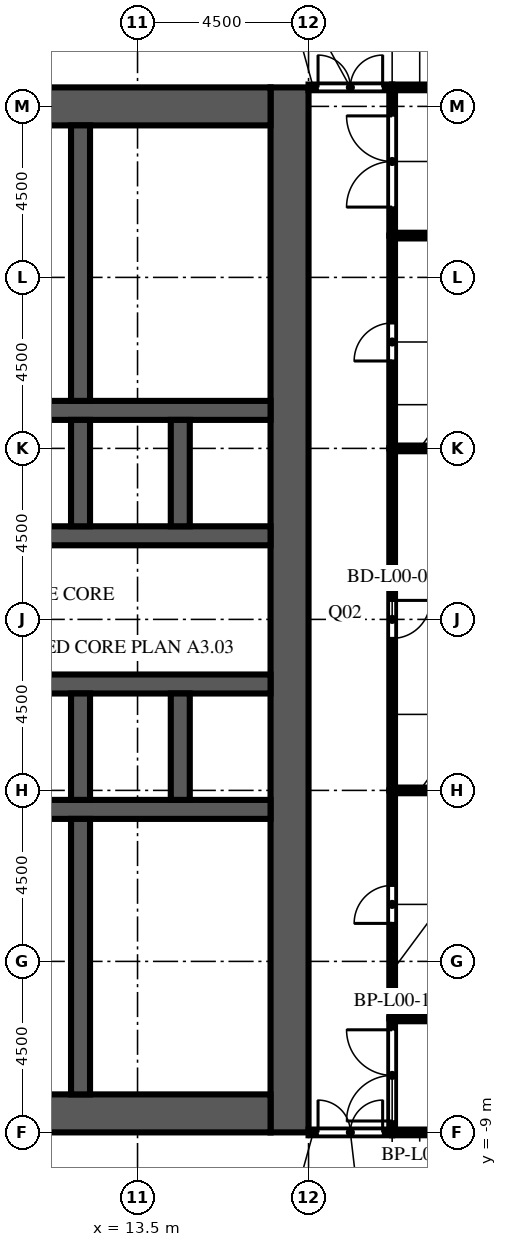
"""IFC4 building model, lengths in metres.
Left out: names, types, materials, properties, quantities, classifications, styles, units other than length and angle.
Written with IfcOpenShell. Run it as: python <this file> out.ifc"""

import sys

from ifc_helpers import new_model, si_unit, direction, frame, frame_2d, origin, place, context, subcontext, project, spatial, rectangle, extrude, element, fill, save


model = new_model("IFC4")
c1 = context("Model", 3, precision=1e-05, world=origin(), true_north=direction((0.0, 1.0)))
c2 = subcontext(c1, "Body", "Model", "MODEL_VIEW")
j1 = project(units=[si_unit("LENGTHUNIT", "METRE"), si_unit("PLANEANGLEUNIT", "RADIAN")], contexts=[c1])
p1 = place(None, origin())
s1 = spatial("IfcSite", under=j1, at=p1, CompositionType="ELEMENT")
p2 = place(p1, origin())
s2 = spatial("IfcBuilding", under=s1, at=p2, CompositionType="ELEMENT")
p3 = place(p2, origin())
s3 = spatial("IfcBuildingStorey", under=s2, at=p3, CompositionType="ELEMENT", Elevation=0.0)
p4 = place(p3, frame((17.5, -9.0, 0.0), z_axis=(0.0, 0.0, 1.0), x_axis=(0.0, 1.0, 0.0)))
e1 = element("IfcWall", 1, at=p4, inside=s3, PredefinedType="SHEAR", context=c2, shape_type="SweptSolid", body=[
    extrude(rectangle(XDim=27.5, YDim=1.0, at=frame_2d((13.75, 0.0))), origin(), (0.0, 0.0, 1.0), 7.2),
])
p5 = place(p4, frame((12.55, 0.0, 0.0)))
e2 = element("IfcOpeningElement", 2, at=p5, cuts=e1, PredefinedType="OPENING", context=c2, shape_type="SweptSolid", body=[
    extrude(rectangle(XDim=2.4, YDim=2.4, at=frame_2d((1.2, 1.2))), frame((0.0, 0.51, 0.0), z_axis=(0.0, -1.0, 0.0), x_axis=(1.0, 0.0, 0.0)), (0.0, 0.0, 1.0), 1.02),
])
p6 = place(p4, frame((6.825, 0.0, 0.0)))
e3 = element("IfcOpeningElement", 3, at=p6, cuts=e1, PredefinedType="OPENING", context=c2, shape_type="SweptSolid", body=[
    extrude(rectangle(XDim=1.2, YDim=2.1, at=frame_2d((0.6, 1.05))), frame((0.0, 0.51, 0.0), z_axis=(0.0, -1.0, 0.0), x_axis=(1.0, 0.0, 0.0)), (0.0, 0.0, 1.0), 1.02),
])
p7 = place(p4, frame((19.475, 0.0, 0.0)))
e4 = element("IfcOpeningElement", 4, at=p7, cuts=e1, PredefinedType="OPENING", context=c2, shape_type="SweptSolid", body=[
    extrude(rectangle(XDim=1.2, YDim=2.1, at=frame_2d((0.6, 1.05))), frame((0.0, 0.51, 0.0), z_axis=(0.0, -1.0, 0.0), x_axis=(1.0, 0.0, 0.0)), (0.0, 0.0, 1.0), 1.02),
])
for number, where, z_axis, x_axis in (
    (5, (7.0, -8.5, 0.0), (0.0, 0.0, 1.0), (1.0, 0.0, 0.0)),
    (6, (7.0, 18.0, 0.0), (0.0, 0.0, 1.0), (1.0, 0.0, 0.0)),
):
    element("IfcWall", number, at=place(p3, frame(where, z_axis=z_axis, x_axis=x_axis)), inside=s3, PredefinedType="SHEAR", context=c2, shape_type="SweptSolid", body=[
        extrude(rectangle(XDim=10.0, YDim=1.0, at=frame_2d((5.0, 0.0))), origin(), (0.0, 0.0, 1.0), 7.2),
    ])
p8 = place(p3, frame((7.0, -0.5, 0.0), z_axis=(0.0, 0.0, 1.0), x_axis=(1.0, 0.0, 0.0)))
e7 = element("IfcWall", 7, at=p8, inside=s3, PredefinedType="SHEAR", context=c2, shape_type="SweptSolid", body=[
    extrude(rectangle(XDim=10.0, YDim=0.5, at=frame_2d((5.0, 0.0))), origin(), (0.0, 0.0, 1.0), 7.2),
])
p9 = place(p3, frame((7.0, 2.8, 0.0), z_axis=(0.0, 0.0, 1.0), x_axis=(1.0, 0.0, 0.0)))
e8 = element("IfcWall", 8, at=p9, inside=s3, PredefinedType="SHEAR", context=c2, shape_type="SweptSolid", body=[
    extrude(rectangle(XDim=10.0, YDim=0.5, at=frame_2d((5.0, 0.0))), origin(), (0.0, 0.0, 1.0), 7.2),
])
p10 = place(p9, frame((0.512, 0.0, 0.0)))
e9 = element("IfcOpeningElement", 9, at=p10, cuts=e8, PredefinedType="OPENING", context=c2, shape_type="SweptSolid", body=[
    extrude(rectangle(XDim=1.1, YDim=2.1, at=frame_2d((0.55, 1.05))), frame((0.0, 0.26, 0.0), z_axis=(0.0, -1.0, 0.0), x_axis=(1.0, 0.0, 0.0)), (0.0, 0.0, 1.0), 0.52),
])
p11 = place(p9, frame((3.137, 0.0, 0.0)))
e10 = element("IfcOpeningElement", 10, at=p11, cuts=e8, PredefinedType="OPENING", context=c2, shape_type="SweptSolid", body=[
    extrude(rectangle(XDim=1.1, YDim=2.1, at=frame_2d((0.55, 1.05))), frame((0.0, 0.26, 0.0), z_axis=(0.0, -1.0, 0.0), x_axis=(1.0, 0.0, 0.0)), (0.0, 0.0, 1.0), 0.52),
])
p12 = place(p9, frame((5.762, 0.0, 0.0)))
e11 = element("IfcOpeningElement", 11, at=p12, cuts=e8, PredefinedType="OPENING", context=c2, shape_type="SweptSolid", body=[
    extrude(rectangle(XDim=1.1, YDim=2.1, at=frame_2d((0.55, 1.05))), frame((0.0, 0.26, 0.0), z_axis=(0.0, -1.0, 0.0), x_axis=(1.0, 0.0, 0.0)), (0.0, 0.0, 1.0), 0.52),
])
p13 = place(p9, frame((8.387, 0.0, 0.0)))
e12 = element("IfcOpeningElement", 12, at=p13, cuts=e8, PredefinedType="OPENING", context=c2, shape_type="SweptSolid", body=[
    extrude(rectangle(XDim=1.1, YDim=2.1, at=frame_2d((0.55, 1.05))), frame((0.0, 0.26, 0.0), z_axis=(0.0, -1.0, 0.0), x_axis=(1.0, 0.0, 0.0)), (0.0, 0.0, 1.0), 0.52),
])
p14 = place(p3, frame((7.0, 6.7, 0.0), z_axis=(0.0, 0.0, 1.0), x_axis=(1.0, 0.0, 0.0)))
e13 = element("IfcWall", 13, at=p14, inside=s3, PredefinedType="SHEAR", context=c2, shape_type="SweptSolid", body=[
    extrude(rectangle(XDim=10.0, YDim=0.5, at=frame_2d((5.0, 0.0))), origin(), (0.0, 0.0, 1.0), 7.2),
])
p15 = place(p14, frame((0.512, 0.0, 0.0)))
e14 = element("IfcOpeningElement", 14, at=p15, cuts=e13, PredefinedType="OPENING", context=c2, shape_type="SweptSolid", body=[
    extrude(rectangle(XDim=1.1, YDim=2.1, at=frame_2d((0.55, 1.05))), frame((0.0, 0.26, 0.0), z_axis=(0.0, -1.0, 0.0), x_axis=(1.0, 0.0, 0.0)), (0.0, 0.0, 1.0), 0.52),
])
p16 = place(p14, frame((3.188, 0.0, 0.0)))
e15 = element("IfcOpeningElement", 15, at=p16, cuts=e13, PredefinedType="OPENING", context=c2, shape_type="SweptSolid", body=[
    extrude(rectangle(XDim=1.0, YDim=2.1, at=frame_2d((0.5, 1.05))), frame((0.0, 0.26, 0.0), z_axis=(0.0, -1.0, 0.0), x_axis=(1.0, 0.0, 0.0)), (0.0, 0.0, 1.0), 0.52),
])
p17 = place(p14, frame((5.812, 0.0, 0.0)))
e16 = element("IfcOpeningElement", 16, at=p17, cuts=e13, PredefinedType="OPENING", context=c2, shape_type="SweptSolid", body=[
    extrude(rectangle(XDim=1.0, YDim=2.1, at=frame_2d((0.5, 1.05))), frame((0.0, 0.26, 0.0), z_axis=(0.0, -1.0, 0.0), x_axis=(1.0, 0.0, 0.0)), (0.0, 0.0, 1.0), 0.52),
])
p18 = place(p14, frame((8.438, 0.0, 0.0)))
e17 = element("IfcOpeningElement", 17, at=p18, cuts=e13, PredefinedType="OPENING", context=c2, shape_type="SweptSolid", body=[
    extrude(rectangle(XDim=1.0, YDim=2.1, at=frame_2d((0.5, 1.05))), frame((0.0, 0.26, 0.0), z_axis=(0.0, -1.0, 0.0), x_axis=(1.0, 0.0, 0.0)), (0.0, 0.0, 1.0), 0.52),
])
p19 = place(p3, frame((7.0, 10.0, 0.0), z_axis=(0.0, 0.0, 1.0), x_axis=(1.0, 0.0, 0.0)))
e18 = element("IfcWall", 18, at=p19, inside=s3, PredefinedType="SHEAR", context=c2, shape_type="SweptSolid", body=[
    extrude(rectangle(XDim=10.0, YDim=0.5, at=frame_2d((5.0, 0.0))), origin(), (0.0, 0.0, 1.0), 7.2),
])
for number, where, z_axis, x_axis in (
    (19, (12.0, -0.25, 0.0), (0.0, 0.0, 1.0), (0.0, 1.0, 0.0)),
    (20, (12.0, 6.95, 0.0), (0.0, 0.0, 1.0), (0.0, 1.0, 0.0)),
    (21, (14.625, -0.25, 0.0), (0.0, 0.0, 1.0), (0.0, 1.0, 0.0)),
    (22, (14.625, 6.95, 0.0), (0.0, 0.0, 1.0), (0.0, 1.0, 0.0)),
):
    element("IfcWall", number, at=place(p3, frame(where, z_axis=z_axis, x_axis=x_axis)), inside=s3, PredefinedType="SHEAR", context=c2, shape_type="SweptSolid", body=[
        extrude(rectangle(XDim=2.8, YDim=0.5, at=frame_2d((1.4, 0.0))), origin(), (0.0, 0.0, 1.0), 7.2),
    ])
for number, where, z_axis, x_axis in (
    (23, (12.0, -8.0, 0.0), (0.0, 0.0, 1.0), (0.0, 1.0, 0.0)),
    (24, (12.0, 10.25, 0.0), (0.0, 0.0, 1.0), (0.0, 1.0, 0.0)),
):
    element("IfcWall", number, at=place(p3, frame(where, z_axis=z_axis, x_axis=x_axis)), inside=s3, PredefinedType="SHEAR", context=c2, shape_type="SweptSolid", body=[
        extrude(rectangle(XDim=7.25, YDim=0.5, at=frame_2d((3.625, 0.0))), origin(), (0.0, 0.0, 1.0), 7.2),
    ])
p20 = place(p3, frame((7.0, -5.245, 0.0), z_axis=(0.0, 0.0, 1.0), x_axis=(1.0, 0.0, 0.0)))
e25 = element("IfcWall", 25, at=p20, inside=s3, PredefinedType="PARTITIONING", context=c2, shape_type="SweptSolid", body=[
    extrude(rectangle(XDim=4.75, YDim=0.1, at=frame_2d((2.375, 0.0))), origin(), (0.0, 0.0, 1.0), 6.75),
])
p21 = place(p20, frame((1.875, 0.0, 0.0)))
e26 = element("IfcOpeningElement", 26, at=p21, cuts=e25, PredefinedType="OPENING", context=c2, shape_type="SweptSolid", body=[
    extrude(rectangle(XDim=1.0, YDim=2.1, at=frame_2d((0.5, 1.05))), frame((0.0, 0.06, 0.0), z_axis=(0.0, -1.0, 0.0), x_axis=(1.0, 0.0, 0.0)), (0.0, 0.0, 1.0), 0.12),
])
p22 = place(p3, frame((9.945, -3.94, 0.0), z_axis=(0.0, 0.0, 1.0), x_axis=(1.0, 0.0, 0.0)))
e27 = element("IfcWall", 27, at=p22, inside=s3, PredefinedType="PARTITIONING", context=c2, shape_type="SweptSolid", body=[
    extrude(rectangle(XDim=1.805, YDim=0.1, at=frame_2d((0.902, 0.0))), origin(), (0.0, 0.0, 1.0), 6.75),
])
p23 = place(p22, frame((0.403, 0.0, 0.0)))
e28 = element("IfcOpeningElement", 28, at=p23, cuts=e27, PredefinedType="OPENING", context=c2, shape_type="SweptSolid", body=[
    extrude(rectangle(XDim=1.0, YDim=2.1, at=frame_2d((0.5, 1.05))), frame((0.0, 0.06, 0.0), z_axis=(0.0, -1.0, 0.0), x_axis=(1.0, 0.0, 0.0)), (0.0, 0.0, 1.0), 0.12),
])
for number, where, z_axis, x_axis in (
    (29, (8.3, 12.425, 0.0), (0.0, 0.0, 1.0), (1.0, 0.0, 0.0)),
    (30, (8.3, 14.962, 0.0), (0.0, 0.0, 1.0), (1.0, 0.0, 0.0)),
):
    element("IfcWall", number, at=place(p3, frame(where, z_axis=z_axis, x_axis=x_axis)), inside=s3, PredefinedType="PARTITIONING", context=c2, shape_type="SweptSolid", body=[
        extrude(rectangle(XDim=3.45, YDim=0.1, at=frame_2d((1.725, 0.0))), origin(), (0.0, 0.0, 1.0), 6.75),
    ])
p24 = place(p3, frame((18.0, -9.0, 0.0), z_axis=(0.0, 0.0, 1.0), x_axis=(1.0, 0.0, 0.0)))
e31 = element("IfcWall", 31, at=p24, inside=s3, PredefinedType="PARTITIONING", context=c2, shape_type="SweptSolid", body=[
    extrude(rectangle(XDim=2.2, YDim=0.15, at=frame_2d((1.1, 0.0))), origin(), (0.0, 0.0, 1.0), 6.75),
])
p25 = place(p24, frame((0.25, 0.0, 0.0)))
e32 = element("IfcOpeningElement", 32, at=p25, cuts=e31, PredefinedType="OPENING", context=c2, shape_type="SweptSolid", body=[
    extrude(rectangle(XDim=1.7, YDim=2.1, at=frame_2d((0.85, 1.05))), frame((0.0, 0.085, 0.0), z_axis=(0.0, -1.0, 0.0), x_axis=(1.0, 0.0, 0.0)), (0.0, 0.0, 1.0), 0.17),
])
p26 = place(p3, frame((20.2, -9.0, 0.0), z_axis=(0.0, 0.0, 1.0), x_axis=(1.0, 0.0, 0.0)))
e33 = element("IfcWall", 33, at=p26, inside=s3, PredefinedType="PARTITIONING", context=c2, shape_type="SweptSolid", body=[
    extrude(rectangle(XDim=1.45, YDim=0.15, at=frame_2d((0.725, 0.0))), origin(), (0.0, 0.0, 1.0), 6.75),
])
p27 = place(p3, frame((20.2, -9.0, 0.0), z_axis=(0.0, 0.0, 1.0), x_axis=(0.0, 1.0, 0.0)))
e34 = element("IfcWall", 34, at=p27, inside=s3, PredefinedType="PARTITIONING", context=c2, shape_type="SweptSolid", body=[
    extrude(rectangle(XDim=3.0, YDim=0.15, at=frame_2d((1.5, 0.0))), origin(), (0.0, 0.0, 1.0), 6.75),
])
p28 = place(p27, frame((0.3, 0.0, 0.0)))
e35 = element("IfcOpeningElement", 35, at=p28, cuts=e34, PredefinedType="OPENING", context=c2, shape_type="SweptSolid", body=[
    extrude(rectangle(XDim=2.4, YDim=2.4, at=frame_2d((1.2, 1.2))), frame((0.0, 0.085, 0.0), z_axis=(0.0, -1.0, 0.0), x_axis=(1.0, 0.0, 0.0)), (0.0, 0.0, 1.0), 0.17),
])
p29 = place(p3, frame((20.2, -6.0, 0.0), z_axis=(0.0, 0.0, 1.0), x_axis=(0.0, 1.0, 0.0)))
e36 = element("IfcWall", 36, at=p29, inside=s3, PredefinedType="PARTITIONING", context=c2, shape_type="SweptSolid", body=[
    extrude(rectangle(XDim=6.0, YDim=0.15, at=frame_2d((3.0, 0.0))), origin(), (0.0, 0.0, 1.0), 6.75),
])
p30 = place(p29, frame((2.5, 0.0, 0.0)))
e37 = element("IfcOpeningElement", 37, at=p30, cuts=e36, PredefinedType="OPENING", context=c2, shape_type="SweptSolid", body=[
    extrude(rectangle(XDim=1.0, YDim=2.1, at=frame_2d((0.5, 1.05))), frame((0.0, 0.085, 0.0), z_axis=(0.0, -1.0, 0.0), x_axis=(1.0, 0.0, 0.0)), (0.0, 0.0, 1.0), 0.17),
])
p31 = place(p3, frame((20.2, 0.0, 0.0), z_axis=(0.0, 0.0, 1.0), x_axis=(0.0, 1.0, 0.0)))
e38 = element("IfcWall", 38, at=p31, inside=s3, PredefinedType="PARTITIONING", context=c2, shape_type="SweptSolid", body=[
    extrude(rectangle(XDim=9.0, YDim=0.15, at=frame_2d((4.5, 0.0))), origin(), (0.0, 0.0, 1.0), 6.75),
])
p32 = place(p31, frame((4.0, 0.0, 0.0)))
e39 = element("IfcOpeningElement", 39, at=p32, cuts=e38, PredefinedType="OPENING", context=c2, shape_type="SweptSolid", body=[
    extrude(rectangle(XDim=1.0, YDim=2.1, at=frame_2d((0.5, 1.05))), frame((0.0, 0.085, 0.0), z_axis=(0.0, -1.0, 0.0), x_axis=(1.0, 0.0, 0.0)), (0.0, 0.0, 1.0), 0.17),
])
p33 = place(p3, frame((20.2, 9.0, 0.0), z_axis=(0.0, 0.0, 1.0), x_axis=(0.0, 1.0, 0.0)))
e40 = element("IfcWall", 40, at=p33, inside=s3, PredefinedType="PARTITIONING", context=c2, shape_type="SweptSolid", body=[
    extrude(rectangle(XDim=5.6, YDim=0.15, at=frame_2d((2.8, 0.0))), origin(), (0.0, 0.0, 1.0), 6.75),
])
p34 = place(p33, frame((2.3, 0.0, 0.0)))
e41 = element("IfcOpeningElement", 41, at=p34, cuts=e40, PredefinedType="OPENING", context=c2, shape_type="SweptSolid", body=[
    extrude(rectangle(XDim=1.0, YDim=2.1, at=frame_2d((0.5, 1.05))), frame((0.0, 0.085, 0.0), z_axis=(0.0, -1.0, 0.0), x_axis=(1.0, 0.0, 0.0)), (0.0, 0.0, 1.0), 0.17),
])
p35 = place(p3, frame((20.2, 14.6, 0.0), z_axis=(0.0, 0.0, 1.0), x_axis=(0.0, 1.0, 0.0)))
e42 = element("IfcWall", 42, at=p35, inside=s3, PredefinedType="PARTITIONING", context=c2, shape_type="SweptSolid", body=[
    extrude(rectangle(XDim=3.9, YDim=0.15, at=frame_2d((1.95, 0.0))), origin(), (0.0, 0.0, 1.0), 6.75),
])
p36 = place(p35, frame((0.75, 0.0, 0.0)))
e43 = element("IfcOpeningElement", 43, at=p36, cuts=e42, PredefinedType="OPENING", context=c2, shape_type="SweptSolid", body=[
    extrude(rectangle(XDim=2.4, YDim=2.4, at=frame_2d((1.2, 1.2))), frame((0.0, 0.085, 0.0), z_axis=(0.0, -1.0, 0.0), x_axis=(1.0, 0.0, 0.0)), (0.0, 0.0, 1.0), 0.17),
])
p37 = place(p3, frame((18.0, 18.5, 0.0), z_axis=(0.0, 0.0, 1.0), x_axis=(1.0, 0.0, 0.0)))
e44 = element("IfcWall", 44, at=p37, inside=s3, PredefinedType="PARTITIONING", context=c2, shape_type="SweptSolid", body=[
    extrude(rectangle(XDim=2.2, YDim=0.15, at=frame_2d((1.1, 0.0))), origin(), (0.0, 0.0, 1.0), 6.75),
])
p38 = place(p37, frame((0.25, 0.0, 0.0)))
e45 = element("IfcOpeningElement", 45, at=p38, cuts=e44, PredefinedType="OPENING", context=c2, shape_type="SweptSolid", body=[
    extrude(rectangle(XDim=1.7, YDim=2.1, at=frame_2d((0.85, 1.05))), frame((0.0, 0.085, 0.0), z_axis=(0.0, -1.0, 0.0), x_axis=(1.0, 0.0, 0.0)), (0.0, 0.0, 1.0), 0.17),
])
p39 = place(p3, frame((20.2, -6.0, 0.0), z_axis=(0.0, 0.0, 1.0), x_axis=(1.0, 0.0, 0.0)))
e46 = element("IfcWall", 46, at=p39, inside=s3, PredefinedType="PARTITIONING", context=c2, shape_type="SweptSolid", body=[
    extrude(rectangle(XDim=15.625, YDim=0.15, at=frame_2d((7.812, 0.0))), origin(), (0.0, 0.0, 1.0), 6.75),
])
for number, where, z_axis, x_axis in (
    (47, (20.2, 0.0, 0.0), (0.0, 0.0, 1.0), (1.0, 0.0, 0.0)),
    (48, (20.2, 9.0, 0.0), (0.0, 0.0, 1.0), (1.0, 0.0, 0.0)),
):
    element("IfcWall", number, at=place(p3, frame(where, z_axis=z_axis, x_axis=x_axis)), inside=s3, PredefinedType="PARTITIONING", context=c2, shape_type="SweptSolid", body=[
        extrude(rectangle(XDim=1.45, YDim=0.15, at=frame_2d((0.725, 0.0))), origin(), (0.0, 0.0, 1.0), 6.75),
    ])
p40 = place(p3, frame((20.2, 14.6, 0.0), z_axis=(0.0, 0.0, 1.0), x_axis=(1.0, 0.0, 0.0)))
e49 = element("IfcWall", 49, at=p40, inside=s3, PredefinedType="PARTITIONING", context=c2, shape_type="SweptSolid", body=[
    extrude(rectangle(XDim=15.625, YDim=0.15, at=frame_2d((7.812, 0.0))), origin(), (0.0, 0.0, 1.0), 6.75),
])
p41 = place(p3, frame((20.2, 18.5, 0.0), z_axis=(0.0, 0.0, 1.0), x_axis=(1.0, 0.0, 0.0)))
e50 = element("IfcWall", 50, at=p41, inside=s3, PredefinedType="PARTITIONING", context=c2, shape_type="SweptSolid", body=[
    extrude(rectangle(XDim=1.45, YDim=0.15, at=frame_2d((0.725, 0.0))), origin(), (0.0, 0.0, 1.0), 6.75),
])
p42 = place(p12, origin())
e51 = element("IfcDoor", 51, at=p42, inside=s3, OperationType="DOUBLE_DOOR_SLIDING", PredefinedType="DOOR", context=c2, shape_type="SweptSolid", body=[
    extrude(rectangle(XDim=1.1, YDim=2.1, at=frame_2d((0.55, 1.05))), frame((0.0, 0.025, 0.0), z_axis=(0.0, -1.0, 0.0), x_axis=(1.0, 0.0, 0.0)), (0.0, 0.0, 1.0), 0.05),
])
fill(e11, e51)
p43 = place(p13, origin())
e52 = element("IfcDoor", 52, at=p43, inside=s3, OperationType="DOUBLE_DOOR_SLIDING", PredefinedType="DOOR", context=c2, shape_type="SweptSolid", body=[
    extrude(rectangle(XDim=1.1, YDim=2.1, at=frame_2d((0.55, 1.05))), frame((0.0, 0.025, 0.0), z_axis=(0.0, -1.0, 0.0), x_axis=(1.0, 0.0, 0.0)), (0.0, 0.0, 1.0), 0.05),
])
fill(e12, e52)
p44 = place(p5, origin())
e53 = element("IfcDoor", 53, at=p44, inside=s3, OperationType="DOUBLE_DOOR_DOUBLE_SWING", PredefinedType="DOOR", context=c2, shape_type="SweptSolid", body=[
    extrude(rectangle(XDim=2.4, YDim=2.4, at=frame_2d((1.2, 1.2))), frame((0.0, 0.025, 0.0), z_axis=(0.0, -1.0, 0.0), x_axis=(1.0, 0.0, 0.0)), (0.0, 0.0, 1.0), 0.05),
])
fill(e2, e53)
p45 = place(p6, frame((1.2, 0.0, 0.0), z_axis=(0.0, 0.0, 1.0), x_axis=(-1.0, 0.0, 0.0)))
e54 = element("IfcDoor", 54, at=p45, inside=s3, OperationType="SINGLE_SWING_LEFT", PredefinedType="DOOR", context=c2, shape_type="SweptSolid", body=[
    extrude(rectangle(XDim=1.2, YDim=2.1, at=frame_2d((0.6, 1.05))), frame((0.0, 0.025, 0.0), z_axis=(0.0, -1.0, 0.0), x_axis=(1.0, 0.0, 0.0)), (0.0, 0.0, 1.0), 0.05),
])
fill(e3, e54)
p46 = place(p7, frame((1.2, 0.0, 0.0), z_axis=(0.0, 0.0, 1.0), x_axis=(-1.0, 0.0, 0.0)))
e55 = element("IfcDoor", 55, at=p46, inside=s3, OperationType="SINGLE_SWING_LEFT", PredefinedType="DOOR", context=c2, shape_type="SweptSolid", body=[
    extrude(rectangle(XDim=1.2, YDim=2.1, at=frame_2d((0.6, 1.05))), frame((0.0, 0.025, 0.0), z_axis=(0.0, -1.0, 0.0), x_axis=(1.0, 0.0, 0.0)), (0.0, 0.0, 1.0), 0.05),
])
fill(e4, e55)
p47 = place(p17, origin())
e56 = element("IfcDoor", 56, at=p47, inside=s3, OperationType="SINGLE_SWING_LEFT", PredefinedType="DOOR", context=c2, shape_type="SweptSolid", body=[
    extrude(rectangle(XDim=1.0, YDim=2.1, at=frame_2d((0.5, 1.05))), frame((0.0, 0.025, 0.0), z_axis=(0.0, -1.0, 0.0), x_axis=(1.0, 0.0, 0.0)), (0.0, 0.0, 1.0), 0.05),
])
fill(e16, e56)
p48 = place(p18, origin())
e57 = element("IfcDoor", 57, at=p48, inside=s3, OperationType="SINGLE_SWING_RIGHT", PredefinedType="DOOR", context=c2, shape_type="SweptSolid", body=[
    extrude(rectangle(XDim=1.0, YDim=2.1, at=frame_2d((0.5, 1.05))), frame((0.0, 0.025, 0.0), z_axis=(0.0, -1.0, 0.0), x_axis=(1.0, 0.0, 0.0)), (0.0, 0.0, 1.0), 0.05),
])
fill(e17, e57)
p49 = place(p23, origin())
e58 = element("IfcDoor", 58, at=p49, inside=s3, OperationType="SINGLE_SWING_LEFT", PredefinedType="DOOR", context=c2, shape_type="SweptSolid", body=[
    extrude(rectangle(XDim=1.0, YDim=2.1, at=frame_2d((0.5, 1.05))), frame((0.0, 0.025, 0.0), z_axis=(0.0, -1.0, 0.0), x_axis=(1.0, 0.0, 0.0)), (0.0, 0.0, 1.0), 0.05),
])
fill(e28, e58)
p50 = place(p30, origin())
e59 = element("IfcDoor", 59, at=p50, inside=s3, OperationType="SINGLE_SWING_LEFT", PredefinedType="DOOR", context=c2, shape_type="SweptSolid", body=[
    extrude(rectangle(XDim=1.0, YDim=2.1, at=frame_2d((0.5, 1.05))), frame((0.0, 0.025, 0.0), z_axis=(0.0, -1.0, 0.0), x_axis=(1.0, 0.0, 0.0)), (0.0, 0.0, 1.0), 0.05),
])
fill(e37, e59)
p51 = place(p32, origin())
e60 = element("IfcDoor", 60, at=p51, inside=s3, OperationType="SINGLE_SWING_RIGHT", PredefinedType="DOOR", context=c2, shape_type="SweptSolid", body=[
    extrude(rectangle(XDim=1.0, YDim=2.1, at=frame_2d((0.5, 1.05))), frame((0.0, 0.025, 0.0), z_axis=(0.0, -1.0, 0.0), x_axis=(1.0, 0.0, 0.0)), (0.0, 0.0, 1.0), 0.05),
])
fill(e39, e60)
p52 = place(p34, origin())
e61 = element("IfcDoor", 61, at=p52, inside=s3, OperationType="SINGLE_SWING_LEFT", PredefinedType="DOOR", context=c2, shape_type="SweptSolid", body=[
    extrude(rectangle(XDim=1.0, YDim=2.1, at=frame_2d((0.5, 1.05))), frame((0.0, 0.025, 0.0), z_axis=(0.0, -1.0, 0.0), x_axis=(1.0, 0.0, 0.0)), (0.0, 0.0, 1.0), 0.05),
])
fill(e41, e61)
p53 = place(p25, origin())
e62 = element("IfcDoor", 62, at=p53, inside=s3, OperationType="DOUBLE_DOOR_DOUBLE_SWING", PredefinedType="DOOR", context=c2, shape_type="SweptSolid", body=[
    extrude(rectangle(XDim=1.7, YDim=2.1, at=frame_2d((0.85, 1.05))), frame((0.0, 0.025, 0.0), z_axis=(0.0, -1.0, 0.0), x_axis=(1.0, 0.0, 0.0)), (0.0, 0.0, 1.0), 0.05),
])
fill(e32, e62)
p54 = place(p28, origin())
e63 = element("IfcDoor", 63, at=p54, inside=s3, OperationType="DOUBLE_DOOR_DOUBLE_SWING", PredefinedType="DOOR", context=c2, shape_type="SweptSolid", body=[
    extrude(rectangle(XDim=2.4, YDim=2.4, at=frame_2d((1.2, 1.2))), frame((0.0, 0.025, 0.0), z_axis=(0.0, -1.0, 0.0), x_axis=(1.0, 0.0, 0.0)), (0.0, 0.0, 1.0), 0.05),
])
fill(e35, e63)
p55 = place(p36, origin())
e64 = element("IfcDoor", 64, at=p55, inside=s3, OperationType="DOUBLE_DOOR_DOUBLE_SWING", PredefinedType="DOOR", context=c2, shape_type="SweptSolid", body=[
    extrude(rectangle(XDim=2.4, YDim=2.4, at=frame_2d((1.2, 1.2))), frame((0.0, 0.025, 0.0), z_axis=(0.0, -1.0, 0.0), x_axis=(1.0, 0.0, 0.0)), (0.0, 0.0, 1.0), 0.05),
])
fill(e43, e64)
p56 = place(p38, origin())
e65 = element("IfcDoor", 65, at=p56, inside=s3, OperationType="DOUBLE_DOOR_DOUBLE_SWING", PredefinedType="DOOR", context=c2, shape_type="SweptSolid", body=[
    extrude(rectangle(XDim=1.7, YDim=2.1, at=frame_2d((0.85, 1.05))), frame((0.0, 0.025, 0.0), z_axis=(0.0, -1.0, 0.0), x_axis=(1.0, 0.0, 0.0)), (0.0, 0.0, 1.0), 0.05),
])
fill(e45, e65)
save(model, sys.argv[1])
